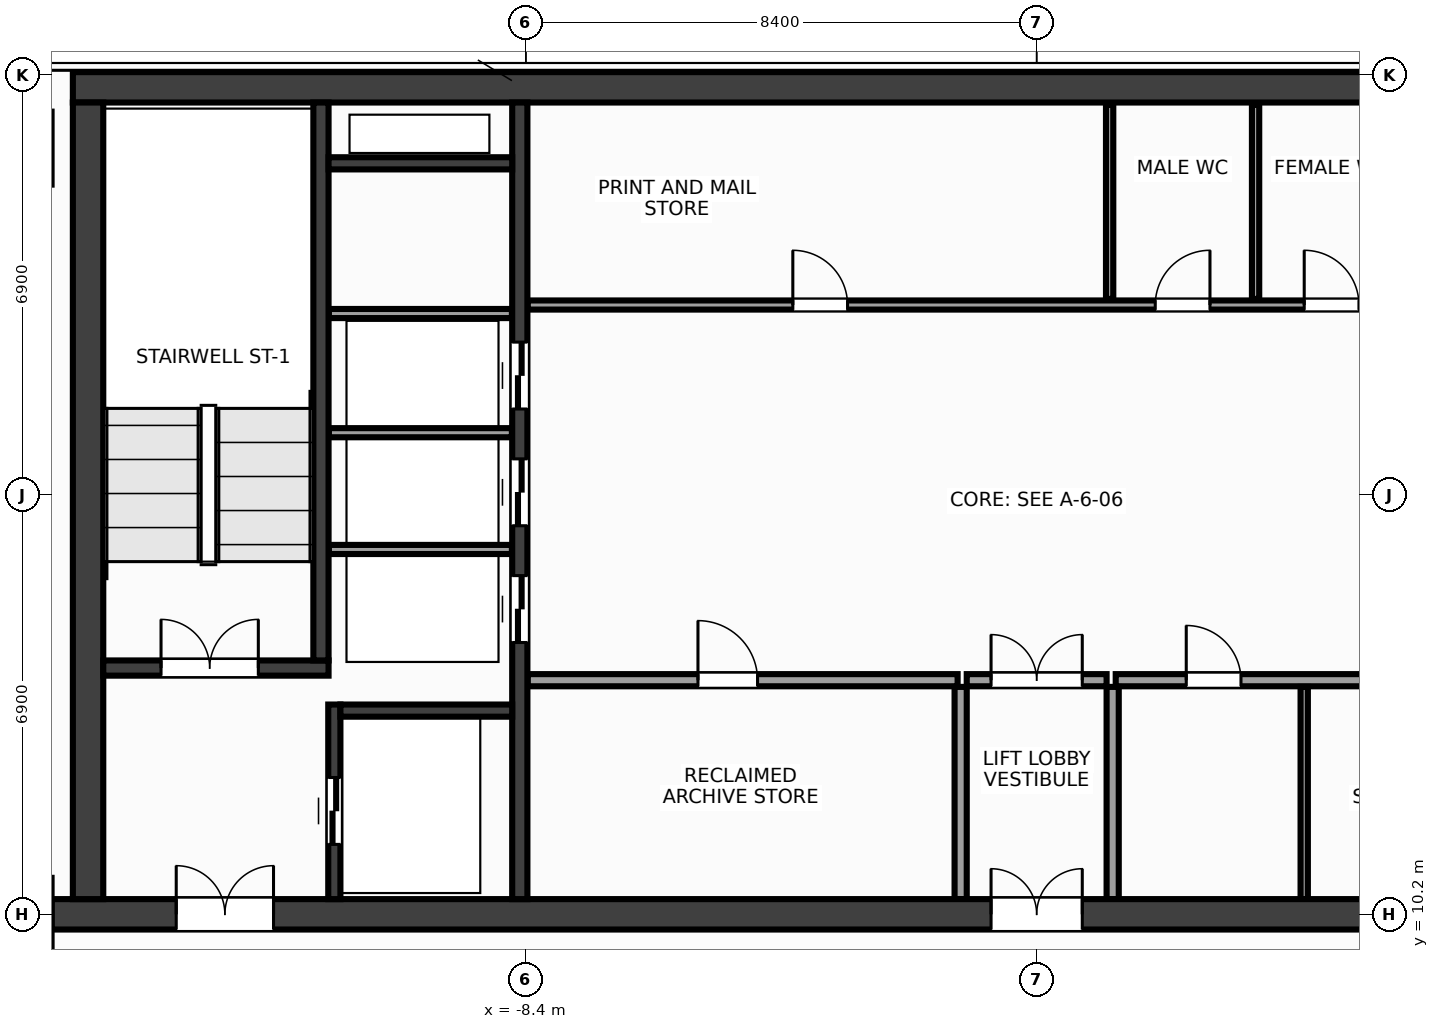
"""IFC4 building model, lengths in metres.
Left out: names, types, materials, properties, quantities, classifications, styles, units other than length and angle.
Written with IfcOpenShell. Run it as: python <this file> out.ifc"""

import sys

from ifc_helpers import new_model, si_unit, direction, frame, frame_2d, origin, place, context, subcontext, project, spatial, rectangle, extrude, source, transform, mapped, element, fill, save


model = new_model("IFC4")
c1 = context("Model", 3, precision=1e-05, world=origin(), true_north=direction((0.0, 1.0)))
c2 = subcontext(c1, "Body", "Model", "MODEL_VIEW")
j1 = project(units=[si_unit("LENGTHUNIT", "METRE"), si_unit("PLANEANGLEUNIT", "RADIAN")], contexts=[c1])
p1 = place(None, origin())
s1 = spatial("IfcSite", under=j1, at=p1, CompositionType="ELEMENT")
p2 = place(p1, origin())
s2 = spatial("IfcBuilding", under=s1, at=p2, CompositionType="ELEMENT")
p3 = place(p2, frame((0.0, 0.0, 279.2)))
s3 = spatial("IfcBuildingStorey", under=s2, at=p3, CompositionType="ELEMENT", Elevation=279.2)
m1 = source(origin(), c2, "Body", "SweptSolid", [
    extrude(rectangle(XDim=31.7, YDim=0.5, at=frame_2d((15.85, 0.0))), origin(), (0.0, 0.0, 1.0), 3.6),
])
p4 = place(p3, frame((-15.85, 23.8, 0.0), z_axis=(0.0, 0.0, 1.0), x_axis=(1.0, 0.0, 0.0)))
e1 = element("IfcWall", 1, at=p4, inside=s3, PredefinedType="SHEAR", context=c2, shape_type="MappedRepresentation", body=[
    mapped(m1, transform((0.0, 0.0, 0.0), x_axis=(1.0, 0.0, 0.0), y_axis=(0.0, 1.0, 0.0), z_axis=(0.0, 0.0, 1.0), scale=1.0)),
])
m2 = source(origin(), c2, "Body", "SweptSolid", [
    extrude(rectangle(XDim=32.4, YDim=0.5, at=frame_2d((16.2, 0.0))), origin(), (0.0, 0.0, 1.0), 3.6),
])
p5 = place(p3, frame((-16.2, 10.2, 0.0), z_axis=(0.0, 0.0, 1.0), x_axis=(1.0, 0.0, 0.0)))
e2 = element("IfcWall", 2, at=p5, inside=s3, PredefinedType="SHEAR", context=c2, shape_type="MappedRepresentation", body=[
    mapped(m2, transform((0.0, 0.0, 0.0), x_axis=(1.0, 0.0, 0.0), y_axis=(0.0, 1.0, 0.0), z_axis=(0.0, 0.0, 1.0), scale=1.0)),
])
p6 = place(p5, frame((2.05, 0.0, 0.0)))
e3 = element("IfcOpeningElement", 3, at=p6, cuts=e2, PredefinedType="OPENING", context=c2, shape_type="SweptSolid", body=[
    extrude(rectangle(XDim=1.6, YDim=2.15, at=frame_2d((0.8, 1.075))), frame((0.0, 0.262, 0.0), z_axis=(0.0, -1.0, 0.0), x_axis=(1.0, 0.0, 0.0)), (0.0, 0.0, 1.0), 0.524),
])
p7 = place(p5, frame((28.75, 0.0, 0.0)))
e4 = element("IfcOpeningElement", 4, at=p7, cuts=e2, PredefinedType="OPENING", context=c2, shape_type="SweptSolid", body=[
    extrude(rectangle(XDim=1.6, YDim=2.15, at=frame_2d((0.8, 1.075))), frame((0.0, 0.262, 0.0), z_axis=(0.0, -1.0, 0.0), x_axis=(1.0, 0.0, 0.0)), (0.0, 0.0, 1.0), 0.524),
])
p8 = place(p5, frame((15.45, 0.0, 0.0)))
e5 = element("IfcOpeningElement", 5, at=p8, cuts=e2, PredefinedType="OPENING", context=c2, shape_type="SweptSolid", body=[
    extrude(rectangle(XDim=1.5, YDim=2.2, at=frame_2d((0.75, 1.1))), frame((0.0, 0.262, 0.0), z_axis=(0.0, -1.0, 0.0), x_axis=(1.0, 0.0, 0.0)), (0.0, 0.0, 1.0), 0.524),
])
m3 = source(origin(), c2, "Body", "SweptSolid", [
    extrude(rectangle(XDim=13.1, YDim=0.5, at=frame_2d((6.55, 0.0))), origin(), (0.0, 0.0, 1.0), 3.6),
])
p9 = place(p3, frame((-15.6, 10.45, 0.0), z_axis=(0.0, 0.0, 1.0), x_axis=(0.0, 1.0, 0.0)))
e6 = element("IfcWall", 6, at=p9, inside=s3, PredefinedType="SHEAR", context=c2, shape_type="MappedRepresentation", body=[
    mapped(m3, transform((0.0, 0.0, 0.0), x_axis=(1.0, 0.0, 0.0), y_axis=(0.0, 1.0, 0.0), z_axis=(0.0, 0.0, 1.0), scale=1.0)),
])
m4 = source(origin(), c2, "Body", "SweptSolid", [
    extrude(rectangle(XDim=13.1, YDim=0.25, at=frame_2d((6.55, 0.0))), origin(), (0.0, 0.0, 1.0), 3.6),
])
p10 = place(p3, frame((-8.5, 10.45, 0.0), z_axis=(0.0, 0.0, 1.0), x_axis=(0.0, 1.0, 0.0)))
e7 = element("IfcWall", 7, at=p10, inside=s3, PredefinedType="SHEAR", context=c2, shape_type="MappedRepresentation", body=[
    mapped(m4, transform((0.0, 0.0, 0.0), x_axis=(1.0, 0.0, 0.0), y_axis=(0.0, 1.0, 0.0), z_axis=(0.0, 0.0, 1.0), scale=1.0)),
])
p11 = place(p10, frame((4.22, 0.0, 0.0)))
e8 = element("IfcOpeningElement", 8, at=p11, cuts=e7, PredefinedType="OPENING", context=c2, shape_type="SweptSolid", body=[
    extrude(rectangle(XDim=1.1, YDim=2.15, at=frame_2d((0.55, 1.075))), frame((0.0, 0.137, 0.0), z_axis=(0.0, -1.0, 0.0), x_axis=(1.0, 0.0, 0.0)), (0.0, 0.0, 1.0), 0.274),
])
p12 = place(p10, frame((6.14, 0.0, 0.0)))
e9 = element("IfcOpeningElement", 9, at=p12, cuts=e7, PredefinedType="OPENING", context=c2, shape_type="SweptSolid", body=[
    extrude(rectangle(XDim=1.1, YDim=2.15, at=frame_2d((0.55, 1.075))), frame((0.0, 0.137, 0.0), z_axis=(0.0, -1.0, 0.0), x_axis=(1.0, 0.0, 0.0)), (0.0, 0.0, 1.0), 0.274),
])
p13 = place(p10, frame((8.06, 0.0, 0.0)))
e10 = element("IfcOpeningElement", 10, at=p13, cuts=e7, PredefinedType="OPENING", context=c2, shape_type="SweptSolid", body=[
    extrude(rectangle(XDim=1.1, YDim=2.15, at=frame_2d((0.55, 1.075))), frame((0.0, 0.137, 0.0), z_axis=(0.0, -1.0, 0.0), x_axis=(1.0, 0.0, 0.0)), (0.0, 0.0, 1.0), 0.274),
])
m5 = source(origin(), c2, "Body", "SweptSolid", [
    extrude(rectangle(XDim=3.705, YDim=0.25, at=frame_2d((1.853, 0.0))), origin(), (0.0, 0.0, 1.0), 3.6),
])
p14 = place(p3, frame((-15.35, 14.25, 0.0), z_axis=(0.0, 0.0, 1.0), x_axis=(1.0, 0.0, 0.0)))
e11 = element("IfcWall", 11, at=p14, inside=s3, PredefinedType="SHEAR", context=c2, shape_type="MappedRepresentation", body=[
    mapped(m5, transform((0.0, 0.0, 0.0), x_axis=(1.0, 0.0, 0.0), y_axis=(0.0, 1.0, 0.0), z_axis=(0.0, 0.0, 1.0), scale=1.0)),
])
p15 = place(p14, frame((0.95, 0.0, 0.0)))
e12 = element("IfcOpeningElement", 12, at=p15, cuts=e11, PredefinedType="OPENING", context=c2, shape_type="SweptSolid", body=[
    extrude(rectangle(XDim=1.6, YDim=2.15, at=frame_2d((0.8, 1.075))), frame((0.0, 0.137, 0.0), z_axis=(0.0, -1.0, 0.0), x_axis=(1.0, 0.0, 0.0)), (0.0, 0.0, 1.0), 0.274),
])
m6 = source(origin(), c2, "Body", "SweptSolid", [
    extrude(rectangle(XDim=9.175, YDim=0.25, at=frame_2d((4.587, 0.0))), origin(), (0.0, 0.0, 1.0), 3.6),
])
p16 = place(p3, frame((-11.77, 14.375, 0.0), z_axis=(0.0, 0.0, 1.0), x_axis=(0.0, 1.0, 0.0)))
e13 = element("IfcWall", 13, at=p16, inside=s3, PredefinedType="SHEAR", context=c2, shape_type="MappedRepresentation", body=[
    mapped(m6, transform((0.0, 0.0, 0.0), x_axis=(1.0, 0.0, 0.0), y_axis=(0.0, 1.0, 0.0), z_axis=(0.0, 0.0, 1.0), scale=1.0)),
])
m7 = source(origin(), c2, "Body", "SweptSolid", [
    extrude(rectangle(XDim=3.2, YDim=0.2, at=frame_2d((1.6, 0.0))), origin(), (0.0, 0.0, 1.0), 3.6),
])
p17 = place(p3, frame((-11.55, 10.45, 0.0), z_axis=(0.0, 0.0, 1.0), x_axis=(0.0, 1.0, 0.0)))
e14 = element("IfcWall", 14, at=p17, inside=s3, PredefinedType="SHEAR", context=c2, shape_type="MappedRepresentation", body=[
    mapped(m7, transform((0.0, 0.0, 0.0), x_axis=(1.0, 0.0, 0.0), y_axis=(0.0, 1.0, 0.0), z_axis=(0.0, 0.0, 1.0), scale=1.0)),
])
p18 = place(p17, frame((0.9, 0.0, 0.0)))
e15 = element("IfcOpeningElement", 15, at=p18, cuts=e14, PredefinedType="OPENING", context=c2, shape_type="SweptSolid", body=[
    extrude(rectangle(XDim=1.1, YDim=2.15, at=frame_2d((0.55, 1.075))), frame((0.0, 0.112, 0.0), z_axis=(0.0, -1.0, 0.0), x_axis=(1.0, 0.0, 0.0)), (0.0, 0.0, 1.0), 0.224),
])
m8 = source(origin(), c2, "Body", "SweptSolid", [
    extrude(rectangle(XDim=2.825, YDim=0.2, at=frame_2d((1.413, 0.0))), origin(), (0.0, 0.0, 1.0), 3.6),
])
p19 = place(p3, frame((-11.45, 13.55, 0.0), z_axis=(0.0, 0.0, 1.0), x_axis=(1.0, 0.0, 0.0)))
e16 = element("IfcWall", 16, at=p19, inside=s3, PredefinedType="SHEAR", context=c2, shape_type="MappedRepresentation", body=[
    mapped(m8, transform((0.0, 0.0, 0.0), x_axis=(1.0, 0.0, 0.0), y_axis=(0.0, 1.0, 0.0), z_axis=(0.0, 0.0, 1.0), scale=1.0)),
])
m9 = source(origin(), c2, "Body", "SweptSolid", [
    extrude(rectangle(XDim=3.02, YDim=0.2, at=frame_2d((1.51, 0.0))), origin(), (0.0, 0.0, 1.0), 3.6),
])
p20 = place(p3, frame((-11.645, 22.55, 0.0), z_axis=(0.0, 0.0, 1.0), x_axis=(1.0, 0.0, 0.0)))
e17 = element("IfcWall", 17, at=p20, inside=s3, PredefinedType="SHEAR", context=c2, shape_type="MappedRepresentation", body=[
    mapped(m9, transform((0.0, 0.0, 0.0), x_axis=(1.0, 0.0, 0.0), y_axis=(0.0, 1.0, 0.0), z_axis=(0.0, 0.0, 1.0), scale=1.0)),
])
m10 = source(origin(), c2, "Body", "SweptSolid", [
    extrude(rectangle(XDim=3.01, YDim=0.15, at=frame_2d((1.505, 0.0))), origin(), (0.0, 0.0, 1.0), 3.37),
])
for number, where, z_axis, x_axis in (
    (18, (-11.64, 16.2, 0.0), (0.0, 0.0, 1.0), (1.0, 0.0, 0.0)),
    (19, (-11.64, 18.12, 0.0), (0.0, 0.0, 1.0), (1.0, 0.0, 0.0)),
    (20, (-11.64, 20.08, 0.0), (0.0, 0.0, 1.0), (1.0, 0.0, 0.0)),
):
    element("IfcWall", number, at=place(p3, frame(where, z_axis=z_axis, x_axis=x_axis)), inside=s3, PredefinedType="PARTITIONING", context=c2, shape_type="MappedRepresentation", body=[
        mapped(m10, transform((0.0, 0.0, 0.0), x_axis=(1.0, 0.0, 0.0), y_axis=(0.0, 1.0, 0.0), z_axis=(0.0, 0.0, 1.0), scale=1.0)),
    ])
m11 = source(origin(), c2, "Body", "SweptSolid", [
    extrude(rectangle(XDim=7.07, YDim=0.2, at=frame_2d((3.535, 0.0))), origin(), (0.0, 0.0, 1.0), 3.37),
])
p21 = place(p3, frame((-8.37, 14.05, 0.0), z_axis=(0.0, 0.0, 1.0), x_axis=(1.0, 0.0, 0.0)))
e21 = element("IfcWall", 21, at=p21, inside=s3, PredefinedType="PARTITIONING", context=c2, shape_type="MappedRepresentation", body=[
    mapped(m11, transform((0.0, 0.0, 0.0), x_axis=(1.0, 0.0, 0.0), y_axis=(0.0, 1.0, 0.0), z_axis=(0.0, 0.0, 1.0), scale=1.0)),
])
p22 = place(p21, frame((2.8, 0.0, 0.0)))
e22 = element("IfcOpeningElement", 22, at=p22, cuts=e21, PredefinedType="OPENING", context=c2, shape_type="SweptSolid", body=[
    extrude(rectangle(XDim=0.98, YDim=2.15, at=frame_2d((0.49, 1.075))), frame((0.0, 0.112, 0.0), z_axis=(0.0, -1.0, 0.0), x_axis=(1.0, 0.0, 0.0)), (0.0, 0.0, 1.0), 0.224),
])
p23 = place(p3, frame((1.3, 14.05, 0.0), z_axis=(0.0, 0.0, 1.0), x_axis=(1.0, 0.0, 0.0)))
e23 = element("IfcWall", 23, at=p23, inside=s3, PredefinedType="PARTITIONING", context=c2, shape_type="MappedRepresentation", body=[
    mapped(m11, transform((0.0, 0.0, 0.0), x_axis=(1.0, 0.0, 0.0), y_axis=(0.0, 1.0, 0.0), z_axis=(0.0, 0.0, 1.0), scale=1.0)),
])
p24 = place(p23, frame((1.16, 0.0, 0.0)))
e24 = element("IfcOpeningElement", 24, at=p24, cuts=e23, PredefinedType="OPENING", context=c2, shape_type="SweptSolid", body=[
    extrude(rectangle(XDim=0.9, YDim=2.15, at=frame_2d((0.45, 1.075))), frame((0.0, 0.112, 0.0), z_axis=(0.0, -1.0, 0.0), x_axis=(1.0, 0.0, 0.0)), (0.0, 0.0, 1.0), 0.224),
])
p25 = place(p23, frame((4.61, 0.0, 0.0)))
e25 = element("IfcOpeningElement", 25, at=p25, cuts=e23, PredefinedType="OPENING", context=c2, shape_type="SweptSolid", body=[
    extrude(rectangle(XDim=0.9, YDim=2.15, at=frame_2d((0.45, 1.075))), frame((0.0, 0.112, 0.0), z_axis=(0.0, -1.0, 0.0), x_axis=(1.0, 0.0, 0.0)), (0.0, 0.0, 1.0), 0.224),
])
m12 = source(origin(), c2, "Body", "SweptSolid", [
    extrude(rectangle(XDim=3.49, YDim=0.2, at=frame_2d((1.745, 0.0))), origin(), (0.0, 0.0, 1.0), 3.37),
])
for number, where, z_axis, x_axis in (
    (26, (-1.25, 10.45, 0.0), (0.0, 0.0, 1.0), (0.0, 1.0, 0.0)),
    (27, (1.25, 10.45, 0.0), (0.0, 0.0, 1.0), (0.0, 1.0, 0.0)),
):
    element("IfcWall", number, at=place(p3, frame(where, z_axis=z_axis, x_axis=x_axis)), inside=s3, PredefinedType="PARTITIONING", context=c2, shape_type="MappedRepresentation", body=[
        mapped(m12, transform((0.0, 0.0, 0.0), x_axis=(1.0, 0.0, 0.0), y_axis=(0.0, 1.0, 0.0), z_axis=(0.0, 0.0, 1.0), scale=1.0)),
    ])
m13 = source(origin(), c2, "Body", "SweptSolid", [
    extrude(rectangle(XDim=2.3, YDim=0.2, at=frame_2d((1.15, 0.0))), origin(), (0.0, 0.0, 1.0), 3.37),
])
p26 = place(p3, frame((-1.15, 14.05, 0.0), z_axis=(0.0, 0.0, 1.0), x_axis=(1.0, 0.0, 0.0)))
e28 = element("IfcWall", 28, at=p26, inside=s3, PredefinedType="PARTITIONING", context=c2, shape_type="MappedRepresentation", body=[
    mapped(m13, transform((0.0, 0.0, 0.0), x_axis=(1.0, 0.0, 0.0), y_axis=(0.0, 1.0, 0.0), z_axis=(0.0, 0.0, 1.0), scale=1.0)),
])
p27 = place(p26, frame((0.4, 0.0, 0.0)))
e29 = element("IfcOpeningElement", 29, at=p27, cuts=e28, PredefinedType="OPENING", context=c2, shape_type="SweptSolid", body=[
    extrude(rectangle(XDim=1.5, YDim=2.2, at=frame_2d((0.75, 1.1))), frame((0.0, 0.112, 0.0), z_axis=(0.0, -1.0, 0.0), x_axis=(1.0, 0.0, 0.0)), (0.0, 0.0, 1.0), 0.224),
])
m14 = source(origin(), c2, "Body", "SweptSolid", [
    extrude(rectangle(XDim=14.59, YDim=0.15, at=frame_2d((7.295, 0.0))), origin(), (0.0, 0.0, 1.0), 3.37),
])
p28 = place(p3, frame((-8.37, 20.22, 0.0), z_axis=(0.0, 0.0, 1.0), x_axis=(1.0, 0.0, 0.0)))
e30 = element("IfcWall", 30, at=p28, inside=s3, PredefinedType="PARTITIONING", context=c2, shape_type="MappedRepresentation", body=[
    mapped(m14, transform((0.0, 0.0, 0.0), x_axis=(1.0, 0.0, 0.0), y_axis=(0.0, 1.0, 0.0), z_axis=(0.0, 0.0, 1.0), scale=1.0)),
])
p29 = place(p28, frame((4.36, 0.0, 0.0)))
e31 = element("IfcOpeningElement", 31, at=p29, cuts=e30, PredefinedType="OPENING", context=c2, shape_type="SweptSolid", body=[
    extrude(rectangle(XDim=0.9, YDim=2.15, at=frame_2d((0.45, 1.075))), frame((0.0, 0.087, 0.0), z_axis=(0.0, -1.0, 0.0), x_axis=(1.0, 0.0, 0.0)), (0.0, 0.0, 1.0), 0.174),
])
p30 = place(p28, frame((10.32, 0.0, 0.0)))
e32 = element("IfcOpeningElement", 32, at=p30, cuts=e30, PredefinedType="OPENING", context=c2, shape_type="SweptSolid", body=[
    extrude(rectangle(XDim=0.9, YDim=2.15, at=frame_2d((0.45, 1.075))), frame((0.0, 0.087, 0.0), z_axis=(0.0, -1.0, 0.0), x_axis=(1.0, 0.0, 0.0)), (0.0, 0.0, 1.0), 0.174),
])
p31 = place(p28, frame((12.77, 0.0, 0.0)))
e33 = element("IfcOpeningElement", 33, at=p31, cuts=e30, PredefinedType="OPENING", context=c2, shape_type="SweptSolid", body=[
    extrude(rectangle(XDim=0.9, YDim=2.15, at=frame_2d((0.45, 1.075))), frame((0.0, 0.087, 0.0), z_axis=(0.0, -1.0, 0.0), x_axis=(1.0, 0.0, 0.0)), (0.0, 0.0, 1.0), 0.174),
])
m15 = source(origin(), c2, "Body", "SweptSolid", [
    extrude(rectangle(XDim=3.49, YDim=0.12, at=frame_2d((1.745, 0.0))), origin(), (0.0, 0.0, 1.0), 3.37),
])
p32 = place(p3, frame((4.4, 10.45, 0.0), z_axis=(0.0, 0.0, 1.0), x_axis=(0.0, 1.0, 0.0)))
e34 = element("IfcWall", 34, at=p32, inside=s3, PredefinedType="PARTITIONING", context=c2, shape_type="MappedRepresentation", body=[
    mapped(m15, transform((0.0, 0.0, 0.0), x_axis=(1.0, 0.0, 0.0), y_axis=(0.0, 1.0, 0.0), z_axis=(0.0, 0.0, 1.0), scale=1.0)),
])
m16 = source(origin(), c2, "Body", "SweptSolid", [
    extrude(rectangle(XDim=3.19, YDim=0.12, at=frame_2d((1.595, 0.0))), origin(), (0.0, 0.0, 1.0), 3.37),
])
for number, where, z_axis, x_axis in (
    (35, (1.2, 20.32, 0.0), (0.0, 0.0, 1.0), (0.0, 1.0, 0.0)),
    (36, (3.6, 20.32, 0.0), (0.0, 0.0, 1.0), (0.0, 1.0, 0.0)),
):
    element("IfcWall", number, at=place(p3, frame(where, z_axis=z_axis, x_axis=x_axis)), inside=s3, PredefinedType="PARTITIONING", context=c2, shape_type="MappedRepresentation", body=[
        mapped(m16, transform((0.0, 0.0, 0.0), x_axis=(1.0, 0.0, 0.0), y_axis=(0.0, 1.0, 0.0), z_axis=(0.0, 0.0, 1.0), scale=1.0)),
    ])
m17 = source(origin(), c2, "Body", "SweptSolid", [
    extrude(rectangle(XDim=1.6, YDim=2.15, at=frame_2d((0.8, 1.075))), frame((0.0, 0.025, 0.0), z_axis=(0.0, -1.0, 0.0), x_axis=(1.0, 0.0, 0.0)), (0.0, 0.0, 1.0), 0.05),
])
p33 = place(p15, origin())
e37 = element("IfcDoor", 37, at=p33, inside=s3, OperationType="DOUBLE_DOOR_SINGLE_SWING", PredefinedType="DOOR", context=c2, shape_type="MappedRepresentation", body=[
    mapped(m17, transform((0.0, 0.0, 0.0), x_axis=(1.0, 0.0, 0.0), y_axis=(0.0, 1.0, 0.0), z_axis=(0.0, 0.0, 1.0), scale=1.0)),
])
fill(e12, e37)
p34 = place(p6, origin())
e38 = element("IfcDoor", 38, at=p34, inside=s3, OperationType="DOUBLE_DOOR_SINGLE_SWING", PredefinedType="DOOR", context=c2, shape_type="MappedRepresentation", body=[
    mapped(m17, transform((0.0, 0.0, 0.0), x_axis=(1.0, 0.0, 0.0), y_axis=(0.0, 1.0, 0.0), z_axis=(0.0, 0.0, 1.0), scale=1.0)),
])
fill(e3, e38)
m18 = source(origin(), c2, "Body", "SweptSolid", [
    extrude(rectangle(XDim=1.1, YDim=2.15, at=frame_2d((0.55, 1.075))), frame((0.0, 0.025, 0.0), z_axis=(0.0, -1.0, 0.0), x_axis=(1.0, 0.0, 0.0)), (0.0, 0.0, 1.0), 0.05),
])
p35 = place(p18, origin())
e39 = element("IfcDoor", 39, at=p35, inside=s3, OperationType="DOUBLE_DOOR_SLIDING", PredefinedType="DOOR", context=c2, shape_type="MappedRepresentation", body=[
    mapped(m18, transform((0.0, 0.0, 0.0), x_axis=(1.0, 0.0, 0.0), y_axis=(0.0, 1.0, 0.0), z_axis=(0.0, 0.0, 1.0), scale=1.0)),
])
fill(e15, e39)
p36 = place(p11, origin())
e40 = element("IfcDoor", 40, at=p36, inside=s3, OperationType="DOUBLE_DOOR_SLIDING", PredefinedType="DOOR", context=c2, shape_type="MappedRepresentation", body=[
    mapped(m18, transform((0.0, 0.0, 0.0), x_axis=(1.0, 0.0, 0.0), y_axis=(0.0, 1.0, 0.0), z_axis=(0.0, 0.0, 1.0), scale=1.0)),
])
fill(e8, e40)
p37 = place(p12, origin())
e41 = element("IfcDoor", 41, at=p37, inside=s3, OperationType="DOUBLE_DOOR_SLIDING", PredefinedType="DOOR", context=c2, shape_type="MappedRepresentation", body=[
    mapped(m18, transform((0.0, 0.0, 0.0), x_axis=(1.0, 0.0, 0.0), y_axis=(0.0, 1.0, 0.0), z_axis=(0.0, 0.0, 1.0), scale=1.0)),
])
fill(e9, e41)
p38 = place(p13, origin())
e42 = element("IfcDoor", 42, at=p38, inside=s3, OperationType="DOUBLE_DOOR_SLIDING", PredefinedType="DOOR", context=c2, shape_type="MappedRepresentation", body=[
    mapped(m18, transform((0.0, 0.0, 0.0), x_axis=(1.0, 0.0, 0.0), y_axis=(0.0, 1.0, 0.0), z_axis=(0.0, 0.0, 1.0), scale=1.0)),
])
fill(e10, e42)
m19 = source(origin(), c2, "Body", "SweptSolid", [
    extrude(rectangle(XDim=0.98, YDim=2.15, at=frame_2d((0.49, 1.075))), frame((0.0, 0.025, 0.0), z_axis=(0.0, -1.0, 0.0), x_axis=(1.0, 0.0, 0.0)), (0.0, 0.0, 1.0), 0.05),
])
p39 = place(p22, origin())
e43 = element("IfcDoor", 43, at=p39, inside=s3, OperationType="SINGLE_SWING_LEFT", PredefinedType="DOOR", context=c2, shape_type="MappedRepresentation", body=[
    mapped(m19, transform((0.0, 0.0, 0.0), x_axis=(1.0, 0.0, 0.0), y_axis=(0.0, 1.0, 0.0), z_axis=(0.0, 0.0, 1.0), scale=1.0)),
])
fill(e22, e43)
m20 = source(origin(), c2, "Body", "SweptSolid", [
    extrude(rectangle(XDim=0.9, YDim=2.15, at=frame_2d((0.45, 1.075))), frame((0.0, 0.025, 0.0), z_axis=(0.0, -1.0, 0.0), x_axis=(1.0, 0.0, 0.0)), (0.0, 0.0, 1.0), 0.05),
])
p40 = place(p24, origin())
e44 = element("IfcDoor", 44, at=p40, inside=s3, OperationType="SINGLE_SWING_LEFT", PredefinedType="DOOR", context=c2, shape_type="MappedRepresentation", body=[
    mapped(m20, transform((0.0, 0.0, 0.0), x_axis=(1.0, 0.0, 0.0), y_axis=(0.0, 1.0, 0.0), z_axis=(0.0, 0.0, 1.0), scale=1.0)),
])
fill(e24, e44)
m21 = source(origin(), c2, "Body", "SweptSolid", [
    extrude(rectangle(XDim=1.5, YDim=2.2, at=frame_2d((0.75, 1.1))), frame((0.0, 0.025, 0.0), z_axis=(0.0, -1.0, 0.0), x_axis=(1.0, 0.0, 0.0)), (0.0, 0.0, 1.0), 0.05),
])
p41 = place(p27, origin())
e45 = element("IfcDoor", 45, at=p41, inside=s3, OperationType="DOUBLE_DOOR_SINGLE_SWING", PredefinedType="DOOR", context=c2, shape_type="MappedRepresentation", body=[
    mapped(m21, transform((0.0, 0.0, 0.0), x_axis=(1.0, 0.0, 0.0), y_axis=(0.0, 1.0, 0.0), z_axis=(0.0, 0.0, 1.0), scale=1.0)),
])
fill(e29, e45)
p42 = place(p8, origin())
e46 = element("IfcDoor", 46, at=p42, inside=s3, OperationType="DOUBLE_DOOR_SINGLE_SWING", PredefinedType="DOOR", context=c2, shape_type="MappedRepresentation", body=[
    mapped(m21, transform((0.0, 0.0, 0.0), x_axis=(1.0, 0.0, 0.0), y_axis=(0.0, 1.0, 0.0), z_axis=(0.0, 0.0, 1.0), scale=1.0)),
])
fill(e5, e46)
p43 = place(p29, origin())
e47 = element("IfcDoor", 47, at=p43, inside=s3, OperationType="SINGLE_SWING_LEFT", PredefinedType="DOOR", context=c2, shape_type="MappedRepresentation", body=[
    mapped(m20, transform((0.0, 0.0, 0.0), x_axis=(1.0, 0.0, 0.0), y_axis=(0.0, 1.0, 0.0), z_axis=(0.0, 0.0, 1.0), scale=1.0)),
])
fill(e31, e47)
p44 = place(p30, origin())
e48 = element("IfcDoor", 48, at=p44, inside=s3, OperationType="SINGLE_SWING_RIGHT", PredefinedType="DOOR", context=c2, shape_type="MappedRepresentation", body=[
    mapped(m20, transform((0.0, 0.0, 0.0), x_axis=(1.0, 0.0, 0.0), y_axis=(0.0, 1.0, 0.0), z_axis=(0.0, 0.0, 1.0), scale=1.0)),
])
fill(e32, e48)
p45 = place(p31, origin())
e49 = element("IfcDoor", 49, at=p45, inside=s3, OperationType="SINGLE_SWING_LEFT", PredefinedType="DOOR", context=c2, shape_type="MappedRepresentation", body=[
    mapped(m20, transform((0.0, 0.0, 0.0), x_axis=(1.0, 0.0, 0.0), y_axis=(0.0, 1.0, 0.0), z_axis=(0.0, 0.0, 1.0), scale=1.0)),
])
fill(e33, e49)
save(model, sys.argv[1])
